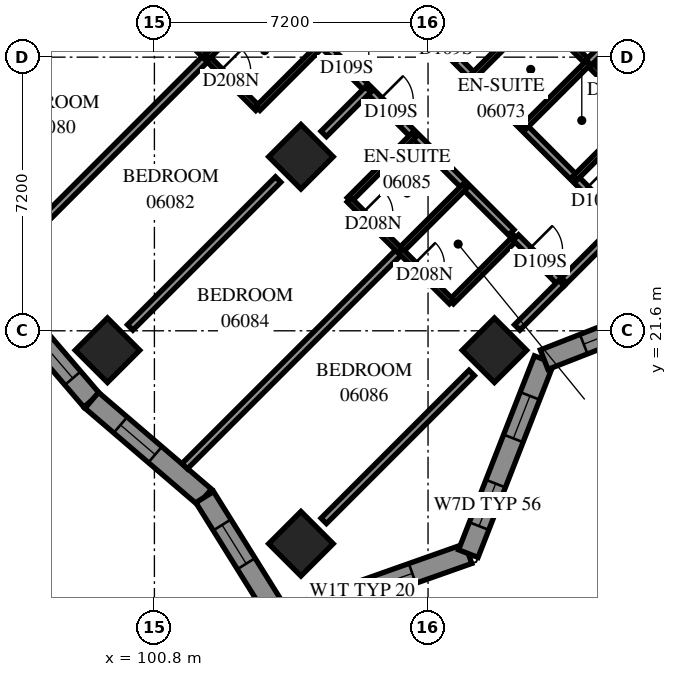
"""IFC4 building model, lengths in metres.
Left out: names, types, materials, properties, quantities, classifications, styles, units other than length and angle.
Written with IfcOpenShell. Run it as: python <this file> out.ifc"""

import sys

from ifc_helpers import new_model, si_unit, direction, frame, frame_2d, origin, origin_2d, place, context, subcontext, project, spatial, polyline, rectangle, outline, extrude, element, fill, save


model = new_model("IFC4")
c1 = context("Model", 3, precision=1e-05, world=origin(), true_north=direction((0.0, 1.0)))
c2 = subcontext(c1, "Body", "Model", "MODEL_VIEW")
j1 = project(units=[si_unit("LENGTHUNIT", "METRE"), si_unit("PLANEANGLEUNIT", "RADIAN")], contexts=[c1])
p1 = place(None, origin())
s1 = spatial("IfcSite", under=j1, at=p1, CompositionType="ELEMENT")
p2 = place(p1, origin())
s2 = spatial("IfcBuilding", under=s1, at=p2, CompositionType="ELEMENT")
p3 = place(p2, frame((0.0, 0.0, 27.0)))
s3 = spatial("IfcBuildingStorey", under=s2, at=p3, CompositionType="ELEMENT", Elevation=27.0)
for number, where, z_axis, x_axis in (
    (1, (104.656, 26.18, 0.0), (0.0, 0.0, 1.0), (0.707, -0.707, 0.0)),
    (2, (99.565, 21.088, 0.0), (0.0, 0.0, 1.0), (0.707, -0.707, 0.0)),
    (3, (109.747, 21.088, 0.0), (0.0, 0.0, 1.0), (0.707, -0.707, 0.0)),
    (4, (104.656, 15.997, 0.0), (0.0, 0.0, 1.0), (0.707, -0.707, 0.0)),
):
    element("IfcColumn", number, at=place(p3, frame(where, z_axis=z_axis, x_axis=x_axis)), inside=s3, PredefinedType="COLUMN", context=c2, shape_type="SweptSolid", body=[
        extrude(rectangle(XDim=1.2, YDim=1.2, at=origin_2d()), origin(), (0.0, 0.0, 1.0), 3.1),
    ])
p4 = place(p3, frame((104.136, 13.997, 0.0), z_axis=(0.0, 0.0, 1.0), x_axis=(0.9428162702, 0.3333128871, 0.0)))
e5 = element("IfcWall", 5, at=p4, inside=s3, PredefinedType="SOLIDWALL", context=c2, shape_type="SweptSolid", body=[
    extrude(outline(polyline([(-0.221, -0.275), (5.348, -0.275), (5.096, 0.275), (0.221, 0.275), (-0.221, -0.275)])), origin(), (0.0, 0.0, 1.0), 3.1),
])
p5 = place(p4, frame((0.86, 0.0, 0.5)))
e6 = element("IfcOpeningElement", 6, at=p5, cuts=e5, PredefinedType="OPENING", context=c2, shape_type="SweptSolid", body=[
    extrude(rectangle(XDim=2.8, YDim=2.45, at=frame_2d((1.4, 1.225))), frame((0.0, 0.285, 0.0), z_axis=(0.0, -1.0, 0.0), x_axis=(1.0, 0.0, 0.0)), (0.0, 0.0, 1.0), 0.57),
])
p6 = place(p3, frame((109.059, 15.737, 0.0), z_axis=(0.0, 0.0, 1.0), x_axis=(0.3641557711, 0.9313380559, 0.0)))
e7 = element("IfcWall", 7, at=p6, inside=s3, PredefinedType="SOLIDWALL", context=c2, shape_type="SweptSolid", body=[
    extrude(outline(polyline([(-0.126, -0.275), (5.36, -0.275), (5.601, 0.275), (0.126, 0.275), (-0.126, -0.275)])), origin(), (0.0, 0.0, 1.0), 3.1),
])
p7 = place(p6, frame((0.778, 0.0, 0.5)))
e8 = element("IfcOpeningElement", 8, at=p7, cuts=e7, PredefinedType="OPENING", context=c2, shape_type="SweptSolid", body=[
    extrude(rectangle(XDim=1.2, YDim=2.45, at=frame_2d((0.6, 1.225))), frame((0.0, 0.285, 0.0), z_axis=(0.0, -1.0, 0.0), x_axis=(1.0, 0.0, 0.0)), (0.0, 0.0, 1.0), 0.57),
])
p8 = place(p6, frame((3.255, 0.0, 0.5)))
e9 = element("IfcOpeningElement", 9, at=p8, cuts=e7, PredefinedType="OPENING", context=c2, shape_type="SweptSolid", body=[
    extrude(rectangle(XDim=1.2, YDim=2.45, at=frame_2d((0.6, 1.225))), frame((0.0, 0.285, 0.0), z_axis=(0.0, -1.0, 0.0), x_axis=(1.0, 0.0, 0.0)), (0.0, 0.0, 1.0), 0.57),
])
p9 = place(p3, frame((111.055, 20.841, 0.0), z_axis=(0.0, 0.0, 1.0), x_axis=(0.9313442446, 0.3641399428, 0.0)))
e10 = element("IfcWall", 10, at=p9, inside=s3, PredefinedType="SOLIDWALL", context=c2, shape_type="SweptSolid", body=[
    extrude(outline(polyline([(0.12, -0.275), (5.606, -0.275), (5.354, 0.275), (-0.12, 0.275), (0.12, -0.275)])), origin(), (0.0, 0.0, 1.0), 3.1),
])
p10 = place(p9, frame((1.118, 0.0, 0.5)))
e11 = element("IfcOpeningElement", 11, at=p10, cuts=e10, PredefinedType="OPENING", context=c2, shape_type="SweptSolid", body=[
    extrude(rectangle(XDim=2.8, YDim=2.45, at=frame_2d((1.4, 1.225))), frame((0.0, 0.285, 0.0), z_axis=(0.0, -1.0, 0.0), x_axis=(1.0, 0.0, 0.0)), (0.0, 0.0, 1.0), 0.57),
])
p11 = place(p3, frame((96.62, 22.726, 0.0), z_axis=(0.0, 0.0, 1.0), x_axis=(0.6505014115, -0.7595050452, 0.0)))
e12 = element("IfcWall", 12, at=p11, inside=s3, PredefinedType="SOLIDWALL", context=c2, shape_type="SweptSolid", body=[
    extrude(outline(polyline([(0.021, -0.275), (3.913, -0.275), (3.87, 0.275), (-0.021, 0.275), (0.021, -0.275)])), origin(), (0.0, 0.0, 1.0), 3.1),
])
p12 = place(p11, frame((0.325, 0.0, 0.5)))
e13 = element("IfcOpeningElement", 13, at=p12, cuts=e12, PredefinedType="OPENING", context=c2, shape_type="SweptSolid", body=[
    extrude(rectangle(XDim=2.8, YDim=2.45, at=frame_2d((1.4, 1.225))), frame((0.0, 0.285, 0.0), z_axis=(0.0, -1.0, 0.0), x_axis=(1.0, 0.0, 0.0)), (0.0, 0.0, 1.0), 0.57),
])
p13 = place(p3, frame((99.151, 19.77, 0.0), z_axis=(0.0, 0.0, 1.0), x_axis=(0.7595163258, -0.6504882403, 0.0)))
e14 = element("IfcWall", 14, at=p13, inside=s3, PredefinedType="SOLIDWALL", context=c2, shape_type="SweptSolid", body=[
    extrude(outline(polyline([(-0.021, -0.275), (3.87, -0.275), (3.955, 0.275), (0.021, 0.275), (-0.021, -0.275)])), origin(), (0.0, 0.0, 1.0), 3.1),
])
p14 = place(p13, frame((0.995, 0.0, 0.5)))
e15 = element("IfcOpeningElement", 15, at=p14, cuts=e14, PredefinedType="OPENING", context=c2, shape_type="SweptSolid", body=[
    extrude(rectangle(XDim=1.2, YDim=2.45, at=frame_2d((0.6, 1.225))), frame((0.0, 0.285, 0.0), z_axis=(0.0, -1.0, 0.0), x_axis=(1.0, 0.0, 0.0)), (0.0, 0.0, 1.0), 0.57),
])
p15 = place(p3, frame((102.123, 17.225, 0.0), z_axis=(0.0, 0.0, 1.0), x_axis=(0.5290322638, -0.848601711, 0.0)))
e16 = element("IfcWall", 16, at=p15, inside=s3, PredefinedType="SOLIDWALL", context=c2, shape_type="SweptSolid", body=[
    extrude(outline(polyline([(0.042, -0.275), (4.025, -0.275), (3.584, 0.275), (-0.042, 0.275), (0.042, -0.275)])), origin(), (0.0, 0.0, 1.0), 3.1),
])
p16 = place(p15, frame((0.865, 0.0, 0.5)))
e17 = element("IfcOpeningElement", 17, at=p16, cuts=e16, PredefinedType="OPENING", context=c2, shape_type="SweptSolid", body=[
    extrude(rectangle(XDim=1.2, YDim=2.45, at=frame_2d((0.6, 1.225))), frame((0.0, 0.285, 0.0), z_axis=(0.0, -1.0, 0.0), x_axis=(1.0, 0.0, 0.0)), (0.0, 0.0, 1.0), 0.57),
])
p17 = place(p3, frame((102.609, 31.769, 0.0), z_axis=(0.0, 0.0, 1.0), x_axis=(0.7071067812, -0.7071067812, 0.0)))
e18 = element("IfcWall", 18, at=p17, inside=s3, PredefinedType="PARTITIONING", context=c2, shape_type="SweptSolid", body=[
    extrude(rectangle(XDim=10.723, YDim=0.2, at=frame_2d((5.361, 0.0))), origin(), (0.0, 0.0, 1.0), 3.1),
])
p18 = place(p17, frame((4.15, 0.0, 0.0)))
e19 = element("IfcOpeningElement", 19, at=p18, cuts=e18, PredefinedType="OPENING", context=c2, shape_type="SweptSolid", body=[
    extrude(rectangle(XDim=0.9, YDim=2.1, at=frame_2d((0.45, 1.05))), frame((0.0, 0.11, 0.0), z_axis=(0.0, -1.0, 0.0), x_axis=(1.0, 0.0, 0.0)), (0.0, 0.0, 1.0), 0.22),
])
p19 = place(p17, frame((5.8, 0.0, 0.0)))
e20 = element("IfcOpeningElement", 20, at=p19, cuts=e18, PredefinedType="OPENING", context=c2, shape_type="SweptSolid", body=[
    extrude(rectangle(XDim=0.9, YDim=2.1, at=frame_2d((0.45, 1.05))), frame((0.0, 0.11, 0.0), z_axis=(0.0, -1.0, 0.0), x_axis=(1.0, 0.0, 0.0)), (0.0, 0.0, 1.0), 0.22),
])
p20 = place(p3, frame((101.597, 18.038, 0.0), z_axis=(0.0, 0.0, 1.0), x_axis=(0.7072439346, 0.7069696012, 0.0)))
e21 = element("IfcWall", 21, at=p20, inside=s3, PredefinedType="PARTITIONING", context=c2, shape_type="SweptSolid", body=[
    extrude(rectangle(XDim=8.019, YDim=0.2, at=frame_2d((4.01, 0.0))), origin(), (0.0, 0.0, 1.0), 3.1),
])
p21 = place(p3, frame((96.54, 23.157, 0.0), z_axis=(0.0, 0.0, 1.0), x_axis=(0.7071067812, 0.7071067812, 0.0)))
e22 = element("IfcWall", 22, at=p21, inside=s3, PredefinedType="PARTITIONING", context=c2, shape_type="SweptSolid", body=[
    extrude(rectangle(XDim=7.977, YDim=0.2, at=frame_2d((3.989, 0.0))), origin(), (0.0, 0.0, 1.0), 3.1),
])
p22 = place(p3, frame((107.977, 29.499, 0.0), z_axis=(0.0, 0.0, 1.0), x_axis=(0.7071067812, -0.7071067812, 0.0)))
e23 = element("IfcWall", 23, at=p22, inside=s3, PredefinedType="PARTITIONING", context=c2, shape_type="SweptSolid", body=[
    extrude(rectangle(XDim=7.198, YDim=0.2, at=frame_2d((3.599, 0.0))), origin(), (0.0, 0.0, 1.0), 3.1),
])
p23 = place(p22, frame((0.247, 0.0, 0.0)))
e24 = element("IfcOpeningElement", 24, at=p23, cuts=e23, PredefinedType="OPENING", context=c2, shape_type="SweptSolid", body=[
    extrude(rectangle(XDim=0.9, YDim=2.1, at=frame_2d((0.45, 1.05))), frame((0.0, 0.11, 0.0), z_axis=(0.0, -1.0, 0.0), x_axis=(1.0, 0.0, 0.0)), (0.0, 0.0, 1.0), 0.22),
])
p24 = place(p22, frame((5.899, 0.0, 0.0)))
e25 = element("IfcOpeningElement", 25, at=p24, cuts=e23, PredefinedType="OPENING", context=c2, shape_type="SweptSolid", body=[
    extrude(rectangle(XDim=0.9, YDim=2.1, at=frame_2d((0.45, 1.05))), frame((0.0, 0.11, 0.0), z_axis=(0.0, -1.0, 0.0), x_axis=(1.0, 0.0, 0.0)), (0.0, 0.0, 1.0), 0.22),
])
p25 = place(p3, frame((105.255, 16.599, 0.0), z_axis=(0.0, 0.0, 1.0), x_axis=(0.7071067812, 0.7071067812, 0.0)))
e26 = element("IfcWall", 26, at=p25, inside=s3, PredefinedType="PARTITIONING", context=c2, shape_type="SweptSolid", body=[
    extrude(rectangle(XDim=5.504, YDim=0.2, at=frame_2d((2.752, 0.0))), origin(), (0.0, 0.0, 1.0), 2.6),
])
p26 = place(p3, frame((100.163, 21.689, 0.0), z_axis=(0.0, 0.0, 1.0), x_axis=(0.7071067812, 0.7071067812, 0.0)))
e27 = element("IfcWall", 27, at=p26, inside=s3, PredefinedType="PARTITIONING", context=c2, shape_type="SweptSolid", body=[
    extrude(rectangle(XDim=5.504, YDim=0.2, at=frame_2d((2.752, 0.0))), origin(), (0.0, 0.0, 1.0), 3.1),
])
p27 = place(p3, frame((95.073, 26.781, 0.0), z_axis=(0.0, 0.0, 1.0), x_axis=(0.7071067812, 0.7071067812, 0.0)))
e28 = element("IfcWall", 28, at=p27, inside=s3, PredefinedType="PARTITIONING", context=c2, shape_type="SweptSolid", body=[
    extrude(rectangle(XDim=5.501, YDim=0.2, at=frame_2d((2.751, 0.0))), origin(), (0.0, 0.0, 1.0), 3.1),
])
p28 = place(p3, frame((110.875, 29.995, 0.0), z_axis=(0.0, 0.0, 1.0), x_axis=(0.7071067812, -0.7071067812, 0.0)))
e29 = element("IfcWall", 29, at=p28, inside=s3, PredefinedType="PARTITIONING", context=c2, shape_type="SweptSolid", body=[
    extrude(rectangle(XDim=3.801, YDim=0.15, at=frame_2d((1.901, 0.0))), origin(), (0.0, 0.0, 1.0), 3.1),
])
p29 = place(p28, frame((0.598, 0.0, 0.0)))
e30 = element("IfcOpeningElement", 30, at=p29, cuts=e29, PredefinedType="OPENING", context=c2, shape_type="SweptSolid", body=[
    extrude(rectangle(XDim=0.8, YDim=2.1, at=frame_2d((0.4, 1.05))), frame((0.0, 0.085, 0.0), z_axis=(0.0, -1.0, 0.0), x_axis=(1.0, 0.0, 0.0)), (0.0, 0.0, 1.0), 0.17),
])
p30 = place(p28, frame((2.507, 0.0, 0.0)))
e31 = element("IfcOpeningElement", 31, at=p30, cuts=e29, PredefinedType="OPENING", context=c2, shape_type="SweptSolid", body=[
    extrude(rectangle(XDim=0.8, YDim=2.1, at=frame_2d((0.4, 1.05))), frame((0.0, 0.085, 0.0), z_axis=(0.0, -1.0, 0.0), x_axis=(1.0, 0.0, 0.0)), (0.0, 0.0, 1.0), 0.17),
])
p31 = place(p3, frame((100.836, 30.138, 0.0), z_axis=(0.0, 0.0, 1.0), x_axis=(0.7065802685, -0.7076329021, 0.0)))
e32 = element("IfcWall", 32, at=p31, inside=s3, PredefinedType="PARTITIONING", context=c2, shape_type="SweptSolid", body=[
    extrude(rectangle(XDim=3.8, YDim=0.15, at=frame_2d((1.9, 0.0))), origin(), (0.0, 0.0, 1.0), 3.1),
])
p32 = place(p31, frame((0.493, 0.0, 0.0)))
e33 = element("IfcOpeningElement", 33, at=p32, cuts=e32, PredefinedType="OPENING", context=c2, shape_type="SweptSolid", body=[
    extrude(rectangle(XDim=0.8, YDim=2.1, at=frame_2d((0.4, 1.05))), frame((0.0, 0.085, 0.0), z_axis=(0.0, -1.0, 0.0), x_axis=(1.0, 0.0, 0.0)), (0.0, 0.0, 1.0), 0.17),
])
p33 = place(p31, frame((2.402, 0.0, 0.0)))
e34 = element("IfcOpeningElement", 34, at=p33, cuts=e32, PredefinedType="OPENING", context=c2, shape_type="SweptSolid", body=[
    extrude(rectangle(XDim=0.8, YDim=2.1, at=frame_2d((0.4, 1.05))), frame((0.0, 0.085, 0.0), z_axis=(0.0, -1.0, 0.0), x_axis=(1.0, 0.0, 0.0)), (0.0, 0.0, 1.0), 0.17),
])
p34 = place(p3, frame((112.221, 28.655, 0.0), z_axis=(0.0, 0.0, 1.0), x_axis=(0.7071067812, 0.7071067812, 0.0)))
e35 = element("IfcWall", 35, at=p34, inside=s3, PredefinedType="PARTITIONING", context=c2, shape_type="SweptSolid", body=[
    extrude(rectangle(XDim=3.15, YDim=0.2, at=frame_2d((1.575, 0.0))), origin(), (0.0, 0.0, 1.0), 3.1),
])
for number, where, z_axis, x_axis in (
    (36, (103.523, 27.453, 0.0), (0.0, 0.0, 1.0), (0.707, 0.707, 0.0)),
    (37, (105.927, 25.049, 0.0), (0.0, 0.0, 1.0), (0.707, 0.707, 0.0)),
    (38, (107.271, 23.705, 0.0), (0.0, 0.0, 1.0), (0.707, 0.707, 0.0)),
):
    element("IfcWall", number, at=place(p3, frame(where, z_axis=z_axis, x_axis=x_axis)), inside=s3, PredefinedType="PARTITIONING", context=c2, shape_type="SweptSolid", body=[
        extrude(rectangle(XDim=2.401, YDim=0.15, at=frame_2d((1.201, 0.0))), origin(), (0.0, 0.0, 1.0), 3.1),
    ])
for number, where, z_axis, x_axis in (
    (39, (109.182, 28.3, 0.0), (0.0, 0.0, 1.0), (0.707, 0.708, 0.0)),
    (40, (111.865, 25.616, 0.0), (0.0, 0.0, 1.0), (0.708, 0.707, 0.0)),
    (41, (110.522, 26.96, 0.0), (0.0, 0.0, 1.0), (0.708, 0.707, 0.0)),
):
    element("IfcWall", number, at=place(p3, frame(where, z_axis=z_axis, x_axis=x_axis)), inside=s3, PredefinedType="PARTITIONING", context=c2, shape_type="SweptSolid", body=[
        extrude(rectangle(XDim=2.4, YDim=0.15, at=frame_2d((1.2, 0.0))), origin(), (0.0, 0.0, 1.0), 3.1),
    ])
for number, where, z_axis, x_axis in (
    (42, (108.615, 22.363, 0.0), (0.0, 0.0, 1.0), (0.707, 0.707, 0.0)),
    (43, (102.181, 28.797, 0.0), (0.0, 0.0, 1.0), (0.707, 0.707, 0.0)),
):
    element("IfcWall", number, at=place(p3, frame(where, z_axis=z_axis, x_axis=x_axis)), inside=s3, PredefinedType="PARTITIONING", context=c2, shape_type="SweptSolid", body=[
        extrude(rectangle(XDim=2.398, YDim=0.15, at=frame_2d((1.199, 0.0))), origin(), (0.0, 0.0, 1.0), 3.1),
    ])
p35 = place(p3, frame((111.513, 22.857, 0.0), z_axis=(0.0, 0.0, 1.0), x_axis=(0.7071067812, 0.7071067812, 0.0)))
e44 = element("IfcWall", 44, at=p35, inside=s3, PredefinedType="PARTITIONING", context=c2, shape_type="SweptSolid", body=[
    extrude(rectangle(XDim=2.2, YDim=0.2, at=frame_2d((1.1, 0.0))), origin(), (0.0, 0.0, 1.0), 2.6),
])
p36 = place(p3, frame((105.925, 25.045, 0.0), z_axis=(0.0, 0.0, 1.0), x_axis=(0.7071067812, -0.7071067812, 0.0)))
e45 = element("IfcWall", 45, at=p36, inside=s3, PredefinedType="PARTITIONING", context=c2, shape_type="SweptSolid", body=[
    extrude(rectangle(XDim=1.901, YDim=0.15, at=frame_2d((0.95, 0.0))), origin(), (0.0, 0.0, 1.0), 3.1),
])
p37 = place(p36, frame((0.493, 0.0, 0.0)))
e46 = element("IfcOpeningElement", 46, at=p37, cuts=e45, PredefinedType="OPENING", context=c2, shape_type="SweptSolid", body=[
    extrude(rectangle(XDim=0.8, YDim=2.1, at=frame_2d((0.4, 1.05))), frame((0.0, 0.085, 0.0), z_axis=(0.0, -1.0, 0.0), x_axis=(1.0, 0.0, 0.0)), (0.0, 0.0, 1.0), 0.17),
])
p38 = place(p3, frame((107.272, 23.704, 0.0), z_axis=(0.0, 0.0, 1.0), x_axis=(0.7076330979, -0.7065800724, 0.0)))
e47 = element("IfcWall", 47, at=p38, inside=s3, PredefinedType="PARTITIONING", context=c2, shape_type="SweptSolid", body=[
    extrude(rectangle(XDim=1.899, YDim=0.15, at=frame_2d((0.95, 0.0))), origin(), (0.0, 0.0, 1.0), 3.1),
])
p39 = place(p38, frame((0.503, 0.0, 0.0)))
e48 = element("IfcOpeningElement", 48, at=p39, cuts=e47, PredefinedType="OPENING", context=c2, shape_type="SweptSolid", body=[
    extrude(rectangle(XDim=0.8, YDim=2.1, at=frame_2d((0.4, 1.05))), frame((0.0, 0.085, 0.0), z_axis=(0.0, -1.0, 0.0), x_axis=(1.0, 0.0, 0.0)), (0.0, 0.0, 1.0), 0.17),
])
p40 = place(p3, frame((110.309, 24.055, 0.0), z_axis=(0.0, 0.0, 1.0), x_axis=(0.7071067812, -0.7071067812, 0.0)))
e49 = element("IfcWall", 49, at=p40, inside=s3, PredefinedType="PARTITIONING", context=c2, shape_type="SweptSolid", body=[
    extrude(rectangle(XDim=1.7, YDim=0.2, at=frame_2d((0.85, 0.0))), origin(), (0.0, 0.0, 1.0), 3.1),
])
p41 = place(p40, frame((0.467, 0.0, 0.0)))
e50 = element("IfcOpeningElement", 50, at=p41, cuts=e49, PredefinedType="OPENING", context=c2, shape_type="SweptSolid", body=[
    extrude(rectangle(XDim=0.9, YDim=2.1, at=frame_2d((0.45, 1.05))), frame((0.0, 0.11, 0.0), z_axis=(0.0, -1.0, 0.0), x_axis=(1.0, 0.0, 0.0)), (0.0, 0.0, 1.0), 0.22),
])
p42 = place(p3, frame((105.255, 26.781, 0.0), z_axis=(0.0, 0.0, 1.0), x_axis=(0.7071067812, 0.7071067812, 0.0)))
e51 = element("IfcWall", 51, at=p42, inside=s3, PredefinedType="PARTITIONING", context=c2, shape_type="SweptSolid", body=[
    extrude(rectangle(XDim=1.652, YDim=0.2, at=frame_2d((0.826, 0.0))), origin(), (0.0, 0.0, 1.0), 3.1),
])
p43 = place(p3, frame((110.346, 21.689, 0.0), z_axis=(0.0, 0.0, 1.0), x_axis=(0.7071067812, 0.7071067812, 0.0)))
e52 = element("IfcWall", 52, at=p43, inside=s3, PredefinedType="PARTITIONING", context=c2, shape_type="SweptSolid", body=[
    extrude(rectangle(XDim=1.652, YDim=0.2, at=frame_2d((0.826, 0.0))), origin(), (0.0, 0.0, 1.0), 2.6),
])
p44 = place(p5, origin())
e53 = element("IfcWindow", 53, at=p44, inside=s3, PartitioningType="SINGLE_PANEL", PredefinedType="WINDOW", context=c2, shape_type="SweptSolid", body=[
    extrude(rectangle(XDim=2.8, YDim=2.45, at=frame_2d((1.4, 1.225))), frame((0.0, 0.155, 0.0), z_axis=(0.0, -1.0, 0.0), x_axis=(1.0, 0.0, 0.0)), (0.0, 0.0, 1.0), 0.06),
])
fill(e6, e53)
p45 = place(p7, origin())
e54 = element("IfcWindow", 54, at=p45, inside=s3, PartitioningType="SINGLE_PANEL", PredefinedType="WINDOW", context=c2, shape_type="SweptSolid", body=[
    extrude(rectangle(XDim=1.2, YDim=2.45, at=frame_2d((0.6, 1.225))), frame((0.0, 0.155, 0.0), z_axis=(0.0, -1.0, 0.0), x_axis=(1.0, 0.0, 0.0)), (0.0, 0.0, 1.0), 0.06),
])
fill(e8, e54)
p46 = place(p8, origin())
e55 = element("IfcWindow", 55, at=p46, inside=s3, PartitioningType="SINGLE_PANEL", PredefinedType="WINDOW", context=c2, shape_type="SweptSolid", body=[
    extrude(rectangle(XDim=1.2, YDim=2.45, at=frame_2d((0.6, 1.225))), frame((0.0, 0.155, 0.0), z_axis=(0.0, -1.0, 0.0), x_axis=(1.0, 0.0, 0.0)), (0.0, 0.0, 1.0), 0.06),
])
fill(e9, e55)
p47 = place(p10, origin())
e56 = element("IfcWindow", 56, at=p47, inside=s3, PartitioningType="SINGLE_PANEL", PredefinedType="WINDOW", context=c2, shape_type="SweptSolid", body=[
    extrude(rectangle(XDim=2.8, YDim=2.45, at=frame_2d((1.4, 1.225))), frame((0.0, 0.155, 0.0), z_axis=(0.0, -1.0, 0.0), x_axis=(1.0, 0.0, 0.0)), (0.0, 0.0, 1.0), 0.06),
])
fill(e11, e56)
p48 = place(p12, origin())
e57 = element("IfcWindow", 57, at=p48, inside=s3, PartitioningType="SINGLE_PANEL", PredefinedType="WINDOW", context=c2, shape_type="SweptSolid", body=[
    extrude(rectangle(XDim=2.8, YDim=2.45, at=frame_2d((1.4, 1.225))), frame((0.0, 0.155, 0.0), z_axis=(0.0, -1.0, 0.0), x_axis=(1.0, 0.0, 0.0)), (0.0, 0.0, 1.0), 0.06),
])
fill(e13, e57)
p49 = place(p14, origin())
e58 = element("IfcWindow", 58, at=p49, inside=s3, PartitioningType="SINGLE_PANEL", PredefinedType="WINDOW", context=c2, shape_type="SweptSolid", body=[
    extrude(rectangle(XDim=1.2, YDim=2.45, at=frame_2d((0.6, 1.225))), frame((0.0, 0.155, 0.0), z_axis=(0.0, -1.0, 0.0), x_axis=(1.0, 0.0, 0.0)), (0.0, 0.0, 1.0), 0.06),
])
fill(e15, e58)
p50 = place(p16, origin())
e59 = element("IfcWindow", 59, at=p50, inside=s3, PartitioningType="SINGLE_PANEL", PredefinedType="WINDOW", context=c2, shape_type="SweptSolid", body=[
    extrude(rectangle(XDim=1.2, YDim=2.45, at=frame_2d((0.6, 1.225))), frame((0.0, 0.155, 0.0), z_axis=(0.0, -1.0, 0.0), x_axis=(1.0, 0.0, 0.0)), (0.0, 0.0, 1.0), 0.06),
])
fill(e17, e59)
p51 = place(p23, origin())
e60 = element("IfcDoor", 60, at=p51, inside=s3, OperationType="SINGLE_SWING_LEFT", PredefinedType="DOOR", context=c2, shape_type="SweptSolid", body=[
    extrude(rectangle(XDim=0.9, YDim=2.1, at=frame_2d((0.45, 1.05))), frame((0.0, 0.025, 0.0), z_axis=(0.0, -1.0, 0.0), x_axis=(1.0, 0.0, 0.0)), (0.0, 0.0, 1.0), 0.05),
])
fill(e24, e60)
p52 = place(p18, origin())
e61 = element("IfcDoor", 61, at=p52, inside=s3, OperationType="SINGLE_SWING_LEFT", PredefinedType="DOOR", context=c2, shape_type="SweptSolid", body=[
    extrude(rectangle(XDim=0.9, YDim=2.1, at=frame_2d((0.45, 1.05))), frame((0.0, 0.025, 0.0), z_axis=(0.0, -1.0, 0.0), x_axis=(1.0, 0.0, 0.0)), (0.0, 0.0, 1.0), 0.05),
])
fill(e19, e61)
p53 = place(p33, origin())
e62 = element("IfcDoor", 62, at=p53, inside=s3, OperationType="SINGLE_SWING_RIGHT", PredefinedType="DOOR", context=c2, shape_type="SweptSolid", body=[
    extrude(rectangle(XDim=0.8, YDim=2.1, at=frame_2d((0.4, 1.05))), frame((0.0, 0.025, 0.0), z_axis=(0.0, -1.0, 0.0), x_axis=(1.0, 0.0, 0.0)), (0.0, 0.0, 1.0), 0.05),
])
fill(e34, e62)
p54 = place(p19, origin())
e63 = element("IfcDoor", 63, at=p54, inside=s3, OperationType="SINGLE_SWING_RIGHT", PredefinedType="DOOR", context=c2, shape_type="SweptSolid", body=[
    extrude(rectangle(XDim=0.9, YDim=2.1, at=frame_2d((0.45, 1.05))), frame((0.0, 0.025, 0.0), z_axis=(0.0, -1.0, 0.0), x_axis=(1.0, 0.0, 0.0)), (0.0, 0.0, 1.0), 0.05),
])
fill(e20, e63)
p55 = place(p37, origin())
e64 = element("IfcDoor", 64, at=p55, inside=s3, OperationType="SINGLE_SWING_RIGHT", PredefinedType="DOOR", context=c2, shape_type="SweptSolid", body=[
    extrude(rectangle(XDim=0.8, YDim=2.1, at=frame_2d((0.4, 1.05))), frame((0.0, 0.025, 0.0), z_axis=(0.0, -1.0, 0.0), x_axis=(1.0, 0.0, 0.0)), (0.0, 0.0, 1.0), 0.05),
])
fill(e46, e64)
p56 = place(p41, origin())
e65 = element("IfcDoor", 65, at=p56, inside=s3, OperationType="SINGLE_SWING_LEFT", PredefinedType="DOOR", context=c2, shape_type="SweptSolid", body=[
    extrude(rectangle(XDim=0.9, YDim=2.1, at=frame_2d((0.45, 1.05))), frame((0.0, 0.025, 0.0), z_axis=(0.0, -1.0, 0.0), x_axis=(1.0, 0.0, 0.0)), (0.0, 0.0, 1.0), 0.05),
])
fill(e50, e65)
p57 = place(p39, origin())
e66 = element("IfcDoor", 66, at=p57, inside=s3, OperationType="SINGLE_SWING_RIGHT", PredefinedType="DOOR", context=c2, shape_type="SweptSolid", body=[
    extrude(rectangle(XDim=0.8, YDim=2.1, at=frame_2d((0.4, 1.05))), frame((0.0, 0.025, 0.0), z_axis=(0.0, -1.0, 0.0), x_axis=(1.0, 0.0, 0.0)), (0.0, 0.0, 1.0), 0.05),
])
fill(e48, e66)
p58 = place(p24, origin())
e67 = element("IfcDoor", 67, at=p58, inside=s3, OperationType="SINGLE_SWING_RIGHT", PredefinedType="DOOR", context=c2, shape_type="SweptSolid", body=[
    extrude(rectangle(XDim=0.9, YDim=2.1, at=frame_2d((0.45, 1.05))), frame((0.0, 0.025, 0.0), z_axis=(0.0, -1.0, 0.0), x_axis=(1.0, 0.0, 0.0)), (0.0, 0.0, 1.0), 0.05),
])
fill(e25, e67)
save(model, sys.argv[1])
